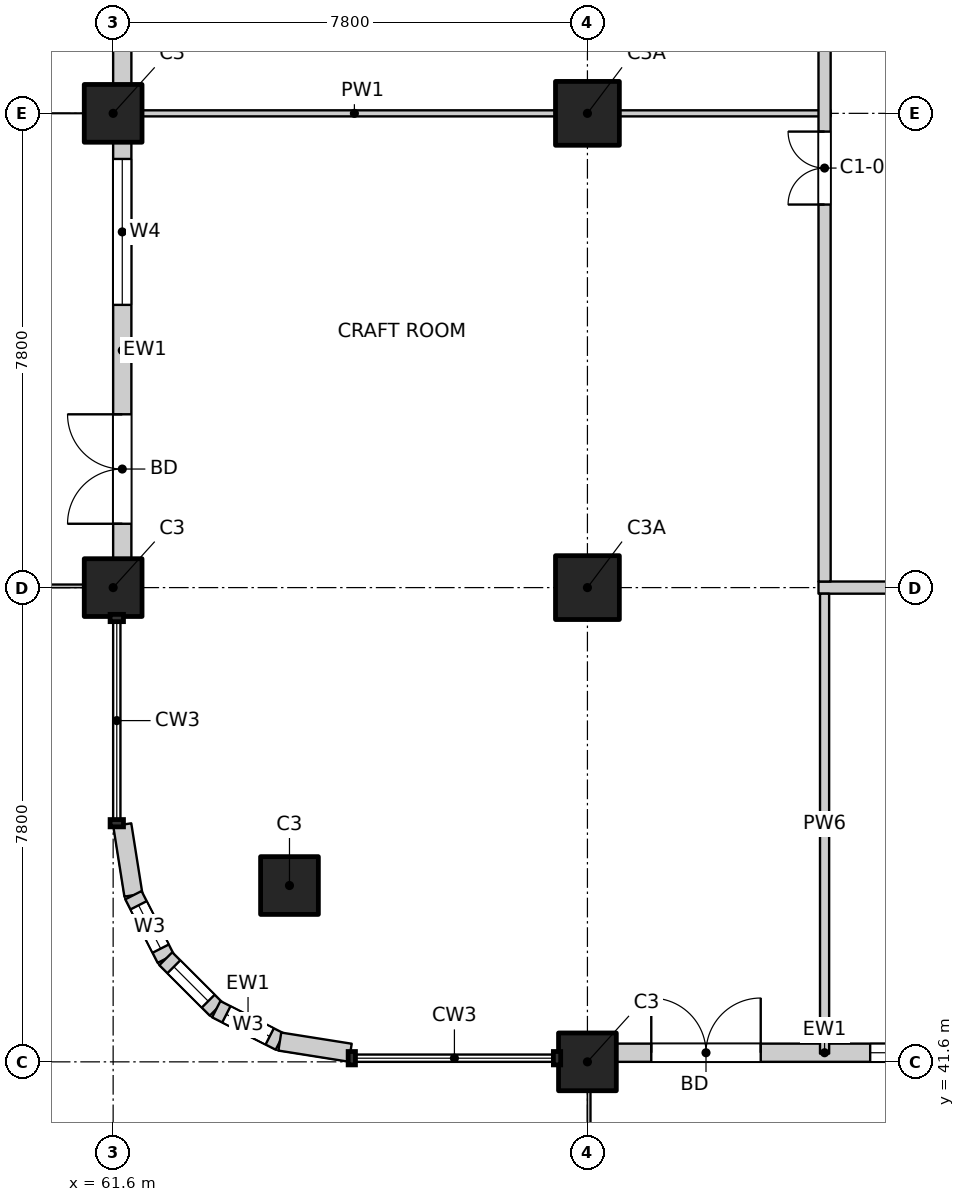
"""IFC4 building model, lengths in metres.
Left out: names, types, materials, properties, quantities, classifications, styles, units other than length and angle.
Written with IfcOpenShell. Run it as: python <this file> out.ifc"""

import sys

from ifc_helpers import new_model, si_unit, direction, frame, frame_2d, origin, origin_2d, place, context, subcontext, project, spatial, rectangle, extrude, element, fill, save


model = new_model("IFC4")
c1 = context("Model", 3, precision=1e-05, world=origin(), true_north=direction((0.0, 1.0)))
c2 = subcontext(c1, "Body", "Model", "MODEL_VIEW")
j1 = project(units=[si_unit("LENGTHUNIT", "METRE"), si_unit("PLANEANGLEUNIT", "RADIAN")], contexts=[c1])
p1 = place(None, origin())
s1 = spatial("IfcSite", under=j1, at=p1, CompositionType="ELEMENT")
p2 = place(p1, origin())
s2 = spatial("IfcBuilding", under=s1, at=p2, CompositionType="ELEMENT")
p3 = place(p2, frame((0.0, 0.0, 71.6)))
s3 = spatial("IfcBuildingStorey", under=s2, at=p3, CompositionType="ELEMENT", Elevation=71.6)
for number, where, z_axis, x_axis in (
    (1, (64.5, 44.5, -0.25), (0.0, 0.0, 1.0), (1.0, 0.0, 0.0)),
    (2, (61.6, 49.4, -0.25), (0.0, 0.0, 1.0), (1.0, 0.0, 0.0)),
    (3, (69.4, 41.6, -0.25), (0.0, 0.0, 1.0), (1.0, 0.0, 0.0)),
    (4, (61.6, 57.2, -0.25), (0.0, 0.0, 1.0), (1.0, 0.0, 0.0)),
):
    element("IfcColumn", number, at=place(p3, frame(where, z_axis=z_axis, x_axis=x_axis)), inside=s3, PredefinedType="COLUMN", context=c2, shape_type="SweptSolid", body=[
        extrude(rectangle(XDim=0.95, YDim=0.95, at=origin_2d()), origin(), (0.0, 0.0, 1.0), 3.4),
    ])
for number, where, z_axis, x_axis in (
    (5, (69.4, 49.4, -0.25), (0.0, 0.0, 1.0), (1.0, 0.0, 0.0)),
    (6, (69.4, 57.2, -0.25), (0.0, 0.0, 1.0), (1.0, 0.0, 0.0)),
):
    element("IfcColumn", number, at=place(p3, frame(where, z_axis=z_axis, x_axis=x_axis)), inside=s3, PredefinedType="COLUMN", context=c2, shape_type="SweptSolid", body=[
        extrude(rectangle(XDim=1.05, YDim=1.05, at=origin_2d()), origin(), (0.0, 0.0, 1.0), 3.4),
    ])
p4 = place(p3, frame((69.875, 41.75, 0.0), z_axis=(0.0, 0.0, 1.0), x_axis=(1.0, 0.0, 0.0)))
e7 = element("IfcWall", 7, at=p4, inside=s3, PredefinedType="SOLIDWALL", context=c2, shape_type="SweptSolid", body=[
    extrude(rectangle(XDim=6.85, YDim=0.3, at=frame_2d((3.425, 0.0))), origin(), (0.0, 0.0, 1.0), 2.7),
])
p5 = place(p4, frame((0.575, 0.0, 0.0)))
e8 = element("IfcOpeningElement", 8, at=p5, cuts=e7, PredefinedType="OPENING", context=c2, shape_type="SweptSolid", body=[
    extrude(rectangle(XDim=1.8, YDim=2.4, at=frame_2d((0.9, 1.2))), frame((0.0, 0.16, 0.0), z_axis=(0.0, -1.0, 0.0), x_axis=(1.0, 0.0, 0.0)), (0.0, 0.0, 1.0), 0.32),
])
p6 = place(p4, frame((4.175, 0.0, 0.6)))
e9 = element("IfcOpeningElement", 9, at=p6, cuts=e7, PredefinedType="OPENING", context=c2, shape_type="SweptSolid", body=[
    extrude(rectangle(XDim=2.4, YDim=2.1, at=frame_2d((1.2, 1.05))), frame((0.0, 0.16, 0.0), z_axis=(0.0, -1.0, 0.0), x_axis=(1.0, 0.0, 0.0)), (0.0, 0.0, 1.0), 0.32),
])
p7 = place(p3, frame((61.75, 49.875, 0.0), z_axis=(0.0, 0.0, 1.0), x_axis=(0.0, 1.0, 0.0)))
e10 = element("IfcWall", 10, at=p7, inside=s3, PredefinedType="SOLIDWALL", context=c2, shape_type="SweptSolid", body=[
    extrude(rectangle(XDim=6.85, YDim=0.3, at=frame_2d((3.425, 0.0))), origin(), (0.0, 0.0, 1.0), 2.7),
])
p8 = place(p7, frame((0.575, 0.0, 0.0)))
e11 = element("IfcOpeningElement", 11, at=p8, cuts=e10, PredefinedType="OPENING", context=c2, shape_type="SweptSolid", body=[
    extrude(rectangle(XDim=1.8, YDim=2.4, at=frame_2d((0.9, 1.2))), frame((0.0, 0.16, 0.0), z_axis=(0.0, -1.0, 0.0), x_axis=(1.0, 0.0, 0.0)), (0.0, 0.0, 1.0), 0.32),
])
p9 = place(p7, frame((4.175, 0.0, 0.6)))
e12 = element("IfcOpeningElement", 12, at=p9, cuts=e10, PredefinedType="OPENING", context=c2, shape_type="SweptSolid", body=[
    extrude(rectangle(XDim=2.4, YDim=2.1, at=frame_2d((1.2, 1.05))), frame((0.0, 0.16, 0.0), z_axis=(0.0, -1.0, 0.0), x_axis=(1.0, 0.0, 0.0)), (0.0, 0.0, 1.0), 0.32),
])
p10 = place(p3, frame((61.75, 57.675, 0.0), z_axis=(0.0, 0.0, 1.0), x_axis=(0.0, 1.0, 0.0)))
e13 = element("IfcWall", 13, at=p10, inside=s3, PredefinedType="SOLIDWALL", context=c2, shape_type="SweptSolid", body=[
    extrude(rectangle(XDim=6.85, YDim=0.3, at=frame_2d((3.425, 0.0))), origin(), (0.0, 0.0, 1.0), 2.7),
])
p11 = place(p10, frame((0.575, 0.0, 0.0)))
e14 = element("IfcOpeningElement", 14, at=p11, cuts=e13, PredefinedType="OPENING", context=c2, shape_type="SweptSolid", body=[
    extrude(rectangle(XDim=1.8, YDim=2.4, at=frame_2d((0.9, 1.2))), frame((0.0, 0.16, 0.0), z_axis=(0.0, -1.0, 0.0), x_axis=(1.0, 0.0, 0.0)), (0.0, 0.0, 1.0), 0.32),
])
p12 = place(p10, frame((4.175, 0.0, 0.6)))
e15 = element("IfcOpeningElement", 15, at=p12, cuts=e13, PredefinedType="OPENING", context=c2, shape_type="SweptSolid", body=[
    extrude(rectangle(XDim=2.4, YDim=2.1, at=frame_2d((1.2, 1.05))), frame((0.0, 0.16, 0.0), z_axis=(0.0, -1.0, 0.0), x_axis=(1.0, 0.0, 0.0)), (0.0, 0.0, 1.0), 0.32),
])
p13 = place(p3, frame((61.75, 45.5, 0.0), z_axis=(0.0, 0.0, 1.0), x_axis=(0.156496880861, -0.987678452879, 0.0)))
e16 = element("IfcWall", 16, at=p13, inside=s3, PredefinedType="SOLIDWALL", context=c2, shape_type="SweptSolid", body=[
    extrude(rectangle(XDim=1.173, YDim=0.3, at=frame_2d((0.586, 0.0))), origin(), (0.0, 0.0, 1.0), 2.7),
])
p14 = place(p3, frame((61.934, 44.341, 0.0), z_axis=(0.0, 0.0, 1.0), x_axis=(0.454025524128, -0.890988677504, 0.0)))
e17 = element("IfcWall", 17, at=p14, inside=s3, PredefinedType="SOLIDWALL", context=c2, shape_type="SweptSolid", body=[
    extrude(rectangle(XDim=1.173, YDim=0.3, at=frame_2d((0.587, 0.0))), origin(), (0.0, 0.0, 1.0), 2.7),
])
p15 = place(p14, frame((0.187, 0.0, 0.9)))
e18 = element("IfcOpeningElement", 18, at=p15, cuts=e17, PredefinedType="OPENING", context=c2, shape_type="SweptSolid", body=[
    extrude(rectangle(XDim=0.8, YDim=1.2, at=frame_2d((0.4, 0.6))), frame((0.0, 0.16, 0.0), z_axis=(0.0, -1.0, 0.0), x_axis=(1.0, 0.0, 0.0)), (0.0, 0.0, 1.0), 0.32),
])
p16 = place(p3, frame((62.466, 43.296, 0.0), z_axis=(0.0, 0.0, 1.0), x_axis=(0.707106781187, -0.707106781187, 0.0)))
e19 = element("IfcWall", 19, at=p16, inside=s3, PredefinedType="SOLIDWALL", context=c2, shape_type="SweptSolid", body=[
    extrude(rectangle(XDim=1.173, YDim=0.3, at=frame_2d((0.586, 0.0))), origin(), (0.0, 0.0, 1.0), 2.7),
])
p17 = place(p16, frame((0.187, 0.0, 0.9)))
e20 = element("IfcOpeningElement", 20, at=p17, cuts=e19, PredefinedType="OPENING", context=c2, shape_type="SweptSolid", body=[
    extrude(rectangle(XDim=0.8, YDim=1.2, at=frame_2d((0.4, 0.6))), frame((0.0, 0.16, 0.0), z_axis=(0.0, -1.0, 0.0), x_axis=(1.0, 0.0, 0.0)), (0.0, 0.0, 1.0), 0.32),
])
p18 = place(p3, frame((63.296, 42.466, 0.0), z_axis=(0.0, 0.0, 1.0), x_axis=(0.890988677504, -0.454025524128, 0.0)))
e21 = element("IfcWall", 21, at=p18, inside=s3, PredefinedType="SOLIDWALL", context=c2, shape_type="SweptSolid", body=[
    extrude(rectangle(XDim=1.173, YDim=0.3, at=frame_2d((0.587, 0.0))), origin(), (0.0, 0.0, 1.0), 2.7),
])
p19 = place(p18, frame((0.187, 0.0, 0.9)))
e22 = element("IfcOpeningElement", 22, at=p19, cuts=e21, PredefinedType="OPENING", context=c2, shape_type="SweptSolid", body=[
    extrude(rectangle(XDim=0.8, YDim=1.2, at=frame_2d((0.4, 0.6))), frame((0.0, 0.16, 0.0), z_axis=(0.0, -1.0, 0.0), x_axis=(1.0, 0.0, 0.0)), (0.0, 0.0, 1.0), 0.32),
])
p20 = place(p3, frame((64.341, 41.934, 0.0), z_axis=(0.0, 0.0, 1.0), x_axis=(0.987678452879, -0.156496880861, 0.0)))
e23 = element("IfcWall", 23, at=p20, inside=s3, PredefinedType="SOLIDWALL", context=c2, shape_type="SweptSolid", body=[
    extrude(rectangle(XDim=1.173, YDim=0.3, at=frame_2d((0.586, 0.0))), origin(), (0.0, 0.0, 1.0), 2.7),
])
p21 = place(p3, frame((73.2, 49.4, 0.0), z_axis=(0.0, 0.0, 1.0), x_axis=(1.0, 0.0, 0.0)))
e24 = element("IfcWall", 24, at=p21, inside=s3, PredefinedType="PARTITIONING", context=c2, shape_type="SweptSolid", body=[
    extrude(rectangle(XDim=23.6, YDim=0.2, at=frame_2d((11.8, 0.0))), origin(), (0.0, 0.0, 1.0), 3.15),
])
p22 = place(p21, frame((5.35, 0.0, 0.0)))
e25 = element("IfcOpeningElement", 25, at=p22, cuts=e24, PredefinedType="OPENING", context=c2, shape_type="SweptSolid", body=[
    extrude(rectangle(XDim=1.2, YDim=2.1, at=frame_2d((0.6, 1.05))), frame((0.0, 0.11, 0.0), z_axis=(0.0, -1.0, 0.0), x_axis=(1.0, 0.0, 0.0)), (0.0, 0.0, 1.0), 0.22),
])
p23 = place(p21, frame((15.1, 0.0, 0.0)))
e26 = element("IfcOpeningElement", 26, at=p23, cuts=e24, PredefinedType="OPENING", context=c2, shape_type="SweptSolid", body=[
    extrude(rectangle(XDim=1.2, YDim=2.1, at=frame_2d((0.6, 1.05))), frame((0.0, 0.11, 0.0), z_axis=(0.0, -1.0, 0.0), x_axis=(1.0, 0.0, 0.0)), (0.0, 0.0, 1.0), 0.22),
])
p24 = place(p21, frame((21.1, 0.0, 0.0)))
e27 = element("IfcOpeningElement", 27, at=p24, cuts=e24, PredefinedType="OPENING", context=c2, shape_type="SweptSolid", body=[
    extrude(rectangle(XDim=0.9, YDim=2.1, at=frame_2d((0.45, 1.05))), frame((0.0, 0.11, 0.0), z_axis=(0.0, -1.0, 0.0), x_axis=(1.0, 0.0, 0.0)), (0.0, 0.0, 1.0), 0.22),
])
p25 = place(p3, frame((61.735, 57.2, 0.0), z_axis=(0.0, 0.0, 1.0), x_axis=(1.0, 0.0, 0.0)))
e28 = element("IfcWall", 28, at=p25, inside=s3, PredefinedType="PARTITIONING", context=c2, shape_type="SweptSolid", body=[
    extrude(rectangle(XDim=7.665, YDim=0.1, at=frame_2d((3.833, 0.0))), origin(), (0.0, 0.0, 1.0), 2.55),
])
p26 = place(p3, frame((69.4, 57.2, 0.0), z_axis=(0.0, 0.0, 1.0), x_axis=(1.0, 0.0, 0.0)))
e29 = element("IfcWall", 29, at=p26, inside=s3, PredefinedType="PARTITIONING", context=c2, shape_type="SweptSolid", body=[
    extrude(rectangle(XDim=4.0, YDim=0.1, at=frame_2d((2.0, 0.0))), origin(), (0.0, 0.0, 1.0), 3.15),
])
p27 = place(p3, frame((73.3, 41.735, 0.0), z_axis=(0.0, 0.0, 1.0), x_axis=(0.0, 1.0, 0.0)))
e30 = element("IfcWall", 30, at=p27, inside=s3, PredefinedType="PARTITIONING", context=c2, shape_type="SweptSolid", body=[
    extrude(rectangle(XDim=7.565, YDim=0.15, at=frame_2d((3.782, 0.0))), origin(), (0.0, 0.0, 1.0), 3.15),
])
p28 = place(p3, frame((73.3, 49.5, 0.0), z_axis=(0.0, 0.0, 1.0), x_axis=(0.0, 1.0, 0.0)))
e31 = element("IfcWall", 31, at=p28, inside=s3, PredefinedType="PARTITIONING", context=c2, shape_type="SweptSolid", body=[
    extrude(rectangle(XDim=34.9, YDim=0.2, at=frame_2d((17.45, 0.0))), origin(), (0.0, 0.0, 1.0), 3.15),
])
p29 = place(p28, frame((6.2, 0.0, 0.0)))
e32 = element("IfcOpeningElement", 32, at=p29, cuts=e31, PredefinedType="OPENING", context=c2, shape_type="SweptSolid", body=[
    extrude(rectangle(XDim=1.2, YDim=2.1, at=frame_2d((0.6, 1.05))), frame((0.0, 0.11, 0.0), z_axis=(0.0, -1.0, 0.0), x_axis=(1.0, 0.0, 0.0)), (0.0, 0.0, 1.0), 0.22),
])
p30 = place(p28, frame((9.05, 0.0, 0.0)))
e33 = element("IfcOpeningElement", 33, at=p30, cuts=e31, PredefinedType="OPENING", context=c2, shape_type="SweptSolid", body=[
    extrude(rectangle(XDim=1.2, YDim=2.1, at=frame_2d((0.6, 1.05))), frame((0.0, 0.11, 0.0), z_axis=(0.0, -1.0, 0.0), x_axis=(1.0, 0.0, 0.0)), (0.0, 0.0, 1.0), 0.22),
])
p31 = place(p28, frame((24.65, 0.0, 0.0)))
e34 = element("IfcOpeningElement", 34, at=p31, cuts=e31, PredefinedType="OPENING", context=c2, shape_type="SweptSolid", body=[
    extrude(rectangle(XDim=1.2, YDim=2.1, at=frame_2d((0.6, 1.05))), frame((0.0, 0.11, 0.0), z_axis=(0.0, -1.0, 0.0), x_axis=(1.0, 0.0, 0.0)), (0.0, 0.0, 1.0), 0.22),
])
p32 = place(p28, frame((33.579, 0.0, 0.0)))
e35 = element("IfcOpeningElement", 35, at=p32, cuts=e31, PredefinedType="OPENING", context=c2, shape_type="SweptSolid", body=[
    extrude(rectangle(XDim=1.2, YDim=2.1, at=frame_2d((0.6, 1.05))), frame((0.0, 0.11, 0.0), z_axis=(0.0, -1.0, 0.0), x_axis=(1.0, 0.0, 0.0)), (0.0, 0.0, 1.0), 0.22),
])
p33 = place(p5, origin())
e36 = element("IfcDoor", 36, at=p33, inside=s3, OperationType="DOUBLE_DOOR_SINGLE_SWING", PredefinedType="DOOR", context=c2, shape_type="SweptSolid", body=[
    extrude(rectangle(XDim=1.8, YDim=2.4, at=frame_2d((0.9, 1.2))), frame((0.0, 0.025, 0.0), z_axis=(0.0, -1.0, 0.0), x_axis=(1.0, 0.0, 0.0)), (0.0, 0.0, 1.0), 0.05),
])
fill(e8, e36)
p34 = place(p6, origin())
e37 = element("IfcWindow", 37, at=p34, inside=s3, PartitioningType="SINGLE_PANEL", PredefinedType="WINDOW", context=c2, shape_type="SweptSolid", body=[
    extrude(rectangle(XDim=2.4, YDim=2.1, at=frame_2d((1.2, 1.05))), frame((0.0, 0.03, 0.0), z_axis=(0.0, -1.0, 0.0), x_axis=(1.0, 0.0, 0.0)), (0.0, 0.0, 1.0), 0.06),
])
fill(e9, e37)
p35 = place(p8, origin())
e38 = element("IfcDoor", 38, at=p35, inside=s3, OperationType="DOUBLE_DOOR_SINGLE_SWING", PredefinedType="DOOR", context=c2, shape_type="SweptSolid", body=[
    extrude(rectangle(XDim=1.8, YDim=2.4, at=frame_2d((0.9, 1.2))), frame((0.0, 0.025, 0.0), z_axis=(0.0, -1.0, 0.0), x_axis=(1.0, 0.0, 0.0)), (0.0, 0.0, 1.0), 0.05),
])
fill(e11, e38)
p36 = place(p9, origin())
e39 = element("IfcWindow", 39, at=p36, inside=s3, PartitioningType="SINGLE_PANEL", PredefinedType="WINDOW", context=c2, shape_type="SweptSolid", body=[
    extrude(rectangle(XDim=2.4, YDim=2.1, at=frame_2d((1.2, 1.05))), frame((0.0, 0.03, 0.0), z_axis=(0.0, -1.0, 0.0), x_axis=(1.0, 0.0, 0.0)), (0.0, 0.0, 1.0), 0.06),
])
fill(e12, e39)
p37 = place(p15, origin())
e40 = element("IfcWindow", 40, at=p37, inside=s3, PartitioningType="SINGLE_PANEL", PredefinedType="WINDOW", context=c2, shape_type="SweptSolid", body=[
    extrude(rectangle(XDim=0.8, YDim=1.2, at=frame_2d((0.4, 0.6))), frame((0.0, 0.03, 0.0), z_axis=(0.0, -1.0, 0.0), x_axis=(1.0, 0.0, 0.0)), (0.0, 0.0, 1.0), 0.06),
])
fill(e18, e40)
p38 = place(p17, origin())
e41 = element("IfcWindow", 41, at=p38, inside=s3, PartitioningType="SINGLE_PANEL", PredefinedType="WINDOW", context=c2, shape_type="SweptSolid", body=[
    extrude(rectangle(XDim=0.8, YDim=1.2, at=frame_2d((0.4, 0.6))), frame((0.0, 0.03, 0.0), z_axis=(0.0, -1.0, 0.0), x_axis=(1.0, 0.0, 0.0)), (0.0, 0.0, 1.0), 0.06),
])
fill(e20, e41)
p39 = place(p19, origin())
e42 = element("IfcWindow", 42, at=p39, inside=s3, PartitioningType="SINGLE_PANEL", PredefinedType="WINDOW", context=c2, shape_type="SweptSolid", body=[
    extrude(rectangle(XDim=0.8, YDim=1.2, at=frame_2d((0.4, 0.6))), frame((0.0, 0.03, 0.0), z_axis=(0.0, -1.0, 0.0), x_axis=(1.0, 0.0, 0.0)), (0.0, 0.0, 1.0), 0.06),
])
fill(e22, e42)
p40 = place(p29, origin())
e43 = element("IfcDoor", 43, at=p40, inside=s3, OperationType="DOUBLE_DOOR_SINGLE_SWING", PredefinedType="DOOR", context=c2, shape_type="SweptSolid", body=[
    extrude(rectangle(XDim=1.2, YDim=2.1, at=frame_2d((0.6, 1.05))), frame((0.0, 0.025, 0.0), z_axis=(0.0, -1.0, 0.0), x_axis=(1.0, 0.0, 0.0)), (0.0, 0.0, 1.0), 0.05),
])
fill(e32, e43)
save(model, sys.argv[1])
